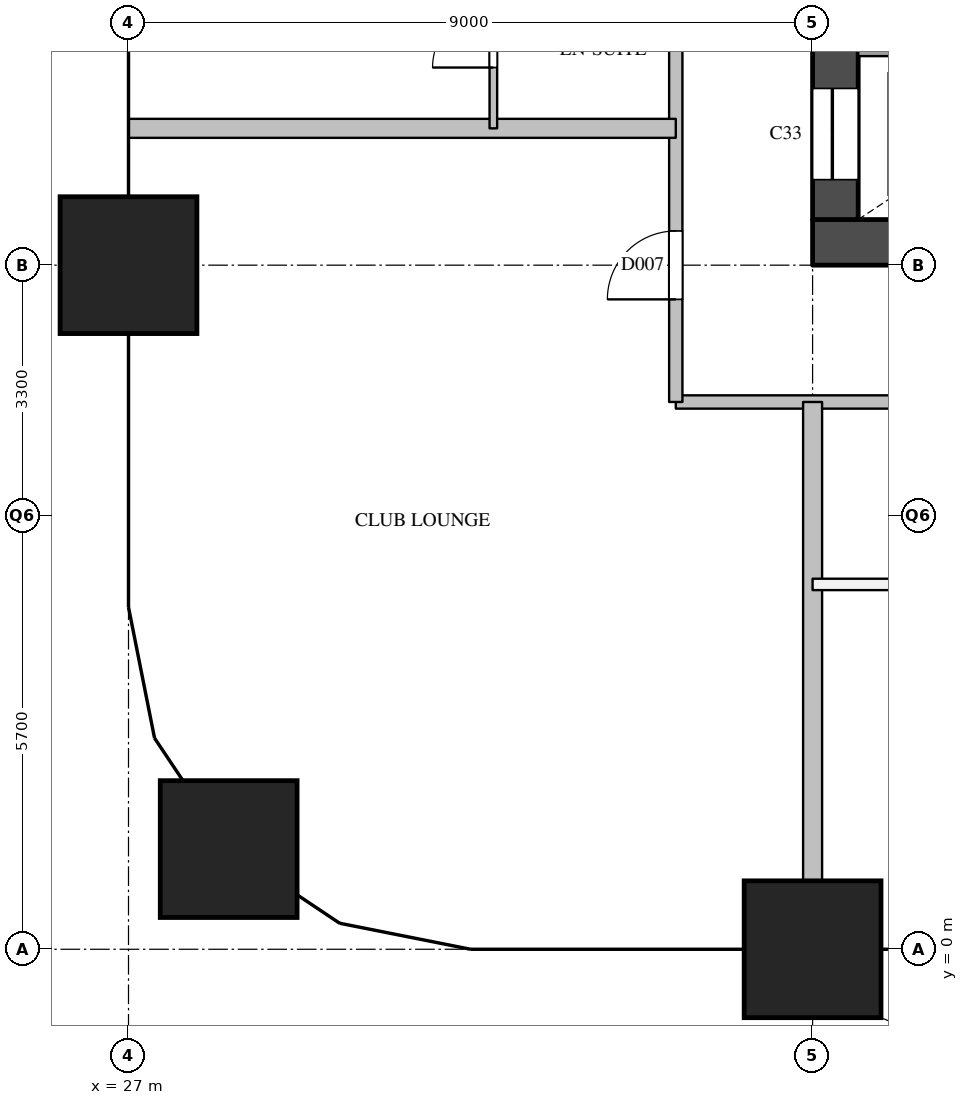
"""IFC4 building model, lengths in metres.
Left out: names, types, materials, properties, quantities, classifications, styles, units other than length and angle.
Written with IfcOpenShell. Run it as: python <this file> out.ifc"""

import sys

from ifc_helpers import new_model, si_unit, direction, frame, frame_2d, origin, origin_2d, place, context, subcontext, project, spatial, rectangle, extrude, element, fill, save


model = new_model("IFC4")
c1 = context("Model", 3, precision=1e-05, world=origin(), true_north=direction((0.0, 1.0)))
c2 = subcontext(c1, "Body", "Model", "MODEL_VIEW")
j1 = project(units=[si_unit("LENGTHUNIT", "METRE"), si_unit("PLANEANGLEUNIT", "RADIAN")], contexts=[c1])
p1 = place(None, origin())
s1 = spatial("IfcSite", under=j1, at=p1, CompositionType="ELEMENT")
p2 = place(p1, origin())
s2 = spatial("IfcBuilding", under=s1, at=p2, CompositionType="ELEMENT")
p3 = place(p2, frame((0.0, 0.0, 112.0)))
s3 = spatial("IfcBuildingStorey", under=s2, at=p3, CompositionType="ELEMENT", Elevation=112.0)
for number, where, z_axis, x_axis in (
    (1, (28.318, 1.318, 0.0), (0.0, 0.0, 1.0), (1.0, 0.0, 0.0)),
    (2, (27.0, 9.0, 0.0), (0.0, 0.0, 1.0), (1.0, 0.0, 0.0)),
    (3, (36.0, 0.0, 0.0), (0.0, 0.0, 1.0), (1.0, 0.0, 0.0)),
):
    element("IfcColumn", number, at=place(p3, frame(where, z_axis=z_axis, x_axis=x_axis)), inside=s3, PredefinedType="COLUMN", context=c2, shape_type="SweptSolid", body=[
        extrude(rectangle(XDim=1.8, YDim=1.8, at=origin_2d()), origin(), (0.0, 0.0, 1.0), 3.8),
    ])
p4 = place(p3, frame((36.0, 9.3, 0.0), z_axis=(0.0, 0.0, 1.0), x_axis=(1.0, 0.0, 0.0)))
e4 = element("IfcWall", 4, at=p4, inside=s3, PredefinedType="SHEAR", context=c2, shape_type="SweptSolid", body=[
    extrude(rectangle(XDim=9.0, YDim=0.6, at=frame_2d((4.5, 0.0))), origin(), (0.0, 0.0, 1.0), 3.5),
])
p5 = place(p3, frame((36.3, 9.6, 0.0), z_axis=(0.0, 0.0, 1.0), x_axis=(0.0, 1.0, 0.0)))
e5 = element("IfcWall", 5, at=p5, inside=s3, PredefinedType="SHEAR", context=c2, shape_type="SweptSolid", body=[
    extrude(rectangle(XDim=12.3, YDim=0.6, at=frame_2d((6.15, 0.0))), origin(), (0.0, 0.0, 1.0), 3.5),
])
p6 = place(p5, frame((0.525, 0.0, 0.0)))
e6 = element("IfcOpeningElement", 6, at=p6, cuts=e5, PredefinedType="OPENING", context=c2, shape_type="SweptSolid", body=[
    extrude(rectangle(XDim=1.2, YDim=2.1, at=frame_2d((0.6, 1.05))), frame((0.0, 0.31, 0.0), z_axis=(0.0, -1.0, 0.0), x_axis=(1.0, 0.0, 0.0)), (0.0, 0.0, 1.0), 0.62),
])
p7 = place(p5, frame((4.8, 0.0, 0.0)))
e7 = element("IfcOpeningElement", 7, at=p7, cuts=e5, PredefinedType="OPENING", context=c2, shape_type="SweptSolid", body=[
    extrude(rectangle(XDim=1.0, YDim=2.1, at=frame_2d((0.5, 1.05))), frame((0.0, 0.31, 0.0), z_axis=(0.0, -1.0, 0.0), x_axis=(1.0, 0.0, 0.0)), (0.0, 0.0, 1.0), 0.62),
])
p8 = place(p3, frame((36.6, 11.85, 0.0), z_axis=(0.0, 0.0, 1.0), x_axis=(1.0, 0.0, 0.0)))
e8 = element("IfcWall", 8, at=p8, inside=s3, PredefinedType="SOLIDWALL", context=c2, shape_type="SweptSolid", body=[
    extrude(rectangle(XDim=7.8, YDim=0.2, at=frame_2d((3.9, 0.0))), origin(), (0.0, 0.0, 1.0), 3.5),
])
p9 = place(p3, frame((34.2, 7.2, 0.0), z_axis=(0.0, 0.0, 1.0), x_axis=(1.0, 0.0, 0.0)))
e9 = element("IfcWall", 9, at=p9, inside=s3, PredefinedType="PARTITIONING", context=c2, shape_type="SweptSolid", body=[
    extrude(rectangle(XDim=12.6, YDim=0.175, at=frame_2d((6.3, 0.0))), origin(), (0.0, 0.0, 1.0), 3.5),
])
p10 = place(p9, frame((3.7, 0.0, 0.0)))
e10 = element("IfcOpeningElement", 10, at=p10, cuts=e9, PredefinedType="OPENING", context=c2, shape_type="SweptSolid", body=[
    extrude(rectangle(XDim=1.0, YDim=2.1, at=frame_2d((0.5, 1.05))), frame((0.0, 0.097, 0.0), z_axis=(0.0, -1.0, 0.0), x_axis=(1.0, 0.0, 0.0)), (0.0, 0.0, 1.0), 0.195),
])
p11 = place(p9, frame((10.3, 0.0, 0.0)))
e11 = element("IfcOpeningElement", 11, at=p11, cuts=e9, PredefinedType="OPENING", context=c2, shape_type="SweptSolid", body=[
    extrude(rectangle(XDim=1.0, YDim=2.1, at=frame_2d((0.5, 1.05))), frame((0.0, 0.097, 0.0), z_axis=(0.0, -1.0, 0.0), x_axis=(1.0, 0.0, 0.0)), (0.0, 0.0, 1.0), 0.195),
])
p12 = place(p3, frame((34.2, 7.2, 0.0), z_axis=(0.0, 0.0, 1.0), x_axis=(0.0, 1.0, 0.0)))
e12 = element("IfcWall", 12, at=p12, inside=s3, PredefinedType="PARTITIONING", context=c2, shape_type="SweptSolid", body=[
    extrude(rectangle(XDim=16.49, YDim=0.175, at=frame_2d((8.245, 0.0))), origin(), (0.0, 0.0, 1.0), 3.5),
])
p13 = place(p12, frame((1.35, 0.0, 0.0)))
e13 = element("IfcOpeningElement", 13, at=p13, cuts=e12, PredefinedType="OPENING", context=c2, shape_type="SweptSolid", body=[
    extrude(rectangle(XDim=0.9, YDim=2.1, at=frame_2d((0.45, 1.05))), frame((0.0, 0.097, 0.0), z_axis=(0.0, -1.0, 0.0), x_axis=(1.0, 0.0, 0.0)), (0.0, 0.0, 1.0), 0.195),
])
p14 = place(p12, frame((7.9, 0.0, 0.0)))
e14 = element("IfcOpeningElement", 14, at=p14, cuts=e12, PredefinedType="OPENING", context=c2, shape_type="SweptSolid", body=[
    extrude(rectangle(XDim=1.0, YDim=2.1, at=frame_2d((0.5, 1.05))), frame((0.0, 0.097, 0.0), z_axis=(0.0, -1.0, 0.0), x_axis=(1.0, 0.0, 0.0)), (0.0, 0.0, 1.0), 0.195),
])
p15 = place(p12, frame((14.345, 0.0, 0.0)))
e15 = element("IfcOpeningElement", 15, at=p15, cuts=e12, PredefinedType="OPENING", context=c2, shape_type="SweptSolid", body=[
    extrude(rectangle(XDim=1.0, YDim=2.1, at=frame_2d((0.5, 1.05))), frame((0.0, 0.097, 0.0), z_axis=(0.0, -1.0, 0.0), x_axis=(1.0, 0.0, 0.0)), (0.0, 0.0, 1.0), 0.195),
])
p16 = place(p3, frame((36.0, 4.8, 0.0), z_axis=(0.0, 0.0, 1.0), x_axis=(1.0, 0.0, 0.0)))
e16 = element("IfcWall", 16, at=p16, inside=s3, PredefinedType="PARTITIONING", context=c2, shape_type="SweptSolid", body=[
    extrude(rectangle(XDim=4.8, YDim=0.15, at=frame_2d((2.4, 0.0))), origin(), (0.0, 0.0, 1.0), 3.5),
])
p17 = place(p16, frame((1.95, 0.0, 0.0)))
e17 = element("IfcOpeningElement", 17, at=p17, cuts=e16, PredefinedType="OPENING", context=c2, shape_type="SweptSolid", body=[
    extrude(rectangle(XDim=0.9, YDim=2.1, at=frame_2d((0.45, 1.05))), frame((0.0, 0.085, 0.0), z_axis=(0.0, -1.0, 0.0), x_axis=(1.0, 0.0, 0.0)), (0.0, 0.0, 1.0), 0.17),
])
p18 = place(p3, frame((27.0, 10.8, 0.0), z_axis=(0.0, 0.0, 1.0), x_axis=(1.0, 0.0, 0.0)))
e18 = element("IfcWall", 18, at=p18, inside=s3, PredefinedType="PARTITIONING", context=c2, shape_type="SweptSolid", body=[
    extrude(rectangle(XDim=7.2, YDim=0.25, at=frame_2d((3.6, 0.0))), origin(), (0.0, 0.0, 1.0), 2.5),
])
p19 = place(p3, frame((36.0, 0.0, 0.0), z_axis=(0.0, 0.0, 1.0), x_axis=(0.0, 1.0, 0.0)))
e19 = element("IfcWall", 19, at=p19, inside=s3, PredefinedType="PARTITIONING", context=c2, shape_type="SweptSolid", body=[
    extrude(rectangle(XDim=7.2, YDim=0.25, at=frame_2d((3.6, 0.0))), origin(), (0.0, 0.0, 1.0), 3.5),
])
p20 = place(p3, frame((31.8, 10.8, 0.0), z_axis=(0.0, 0.0, 1.0), x_axis=(0.0, 1.0, 0.0)))
e20 = element("IfcWall", 20, at=p20, inside=s3, PredefinedType="PARTITIONING", context=c2, shape_type="SweptSolid", body=[
    extrude(rectangle(XDim=2.4, YDim=0.1, at=frame_2d((1.2, 0.0))), origin(), (0.0, 0.0, 1.0), 3.5),
])
p21 = place(p20, frame((0.8, 0.0, 0.0)))
e21 = element("IfcOpeningElement", 21, at=p21, cuts=e20, PredefinedType="OPENING", context=c2, shape_type="SweptSolid", body=[
    extrude(rectangle(XDim=0.8, YDim=2.1, at=frame_2d((0.4, 1.05))), frame((0.0, 0.06, 0.0), z_axis=(0.0, -1.0, 0.0), x_axis=(1.0, 0.0, 0.0)), (0.0, 0.0, 1.0), 0.12),
])
p22 = place(p6, origin())
e22 = element("IfcDoor", 22, at=p22, inside=s3, OperationType="SLIDING_TO_LEFT", PredefinedType="DOOR", context=c2, shape_type="SweptSolid", body=[
    extrude(rectangle(XDim=1.2, YDim=2.1, at=frame_2d((0.6, 1.05))), frame((0.0, 0.025, 0.0), z_axis=(0.0, -1.0, 0.0), x_axis=(1.0, 0.0, 0.0)), (0.0, 0.0, 1.0), 0.05),
])
fill(e6, e22)
p23 = place(p13, origin())
e23 = element("IfcDoor", 23, at=p23, inside=s3, OperationType="SINGLE_SWING_LEFT", PredefinedType="DOOR", context=c2, shape_type="SweptSolid", body=[
    extrude(rectangle(XDim=0.9, YDim=2.1, at=frame_2d((0.45, 1.05))), frame((0.0, 0.025, 0.0), z_axis=(0.0, -1.0, 0.0), x_axis=(1.0, 0.0, 0.0)), (0.0, 0.0, 1.0), 0.05),
])
fill(e13, e23)
p24 = place(p21, origin())
e24 = element("IfcDoor", 24, at=p24, inside=s3, OperationType="SINGLE_SWING_LEFT", PredefinedType="DOOR", context=c2, shape_type="SweptSolid", body=[
    extrude(rectangle(XDim=0.8, YDim=2.1, at=frame_2d((0.4, 1.05))), frame((0.0, 0.025, 0.0), z_axis=(0.0, -1.0, 0.0), x_axis=(1.0, 0.0, 0.0)), (0.0, 0.0, 1.0), 0.05),
])
fill(e21, e24)
save(model, sys.argv[1])
